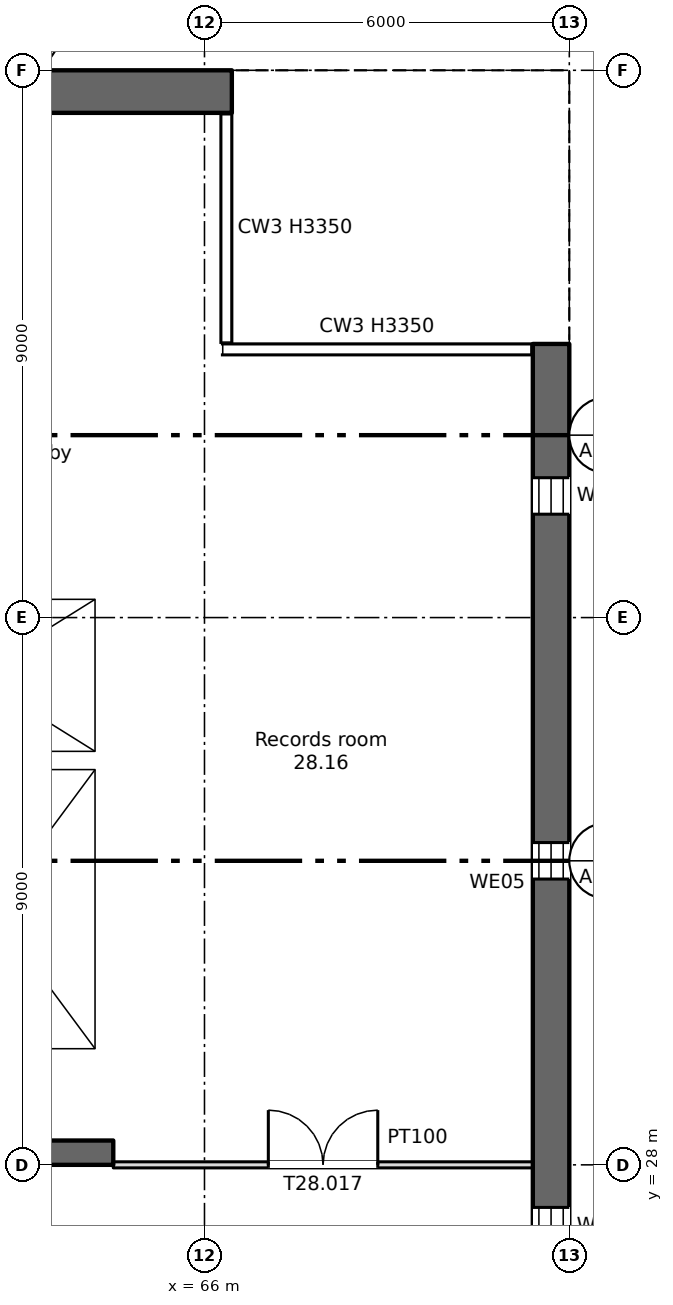
"""IFC4 building model, lengths in metres.
Left out: names, types, materials, properties, quantities, classifications, styles, units other than length and angle.
Written with IfcOpenShell. Run it as: python <this file> out.ifc"""

import sys

from ifc_helpers import new_model, si_unit, direction, frame, frame_2d, origin, place, context, subcontext, project, spatial, rectangle, extrude, element, fill, save


model = new_model("IFC4")
c1 = context("Model", 3, precision=1e-05, world=origin(), true_north=direction((0.0, 1.0)))
c2 = subcontext(c1, "Body", "Model", "MODEL_VIEW")
j1 = project(units=[si_unit("LENGTHUNIT", "METRE"), si_unit("PLANEANGLEUNIT", "RADIAN")], contexts=[c1])
p1 = place(None, origin())
s1 = spatial("IfcSite", under=j1, at=p1, CompositionType="ELEMENT")
p2 = place(p1, origin())
s2 = spatial("IfcBuilding", under=s1, at=p2, CompositionType="ELEMENT")
p3 = place(p2, frame((0.0, 0.0, 193.0)))
s3 = spatial("IfcBuildingStorey", under=s2, at=p3, CompositionType="ELEMENT", Elevation=193.0)
p4 = place(p3, frame((71.7, 7.5, 0.0), z_axis=(0.0, 0.0, 1.0), x_axis=(0.0, 1.0, 0.0)))
e1 = element("IfcWall", 1, at=p4, inside=s3, PredefinedType="SHEAR", context=c2, shape_type="SweptSolid", body=[
    extrude(rectangle(XDim=34.0, YDim=0.6, at=frame_2d((17.0, 0.0))), origin(), (0.0, 0.0, 1.0), 3.35),
])
p5 = place(p4, frame((1.2, 0.0, 0.6)))
e2 = element("IfcOpeningElement", 2, at=p5, cuts=e1, PredefinedType="OPENING", context=c2, shape_type="SweptSolid", body=[
    extrude(rectangle(XDim=0.6, YDim=2.4, at=frame_2d((0.3, 1.2))), frame((0.0, 0.31, 0.0), z_axis=(0.0, -1.0, 0.0), x_axis=(1.0, 0.0, 0.0)), (0.0, 0.0, 1.0), 0.62),
])
p6 = place(p4, frame((7.2, 0.0, 0.6)))
e3 = element("IfcOpeningElement", 3, at=p6, cuts=e1, PredefinedType="OPENING", context=c2, shape_type="SweptSolid", body=[
    extrude(rectangle(XDim=0.6, YDim=2.4, at=frame_2d((0.3, 1.2))), frame((0.0, 0.31, 0.0), z_axis=(0.0, -1.0, 0.0), x_axis=(1.0, 0.0, 0.0)), (0.0, 0.0, 1.0), 0.62),
])
p7 = place(p4, frame((13.2, 0.0, 0.6)))
e4 = element("IfcOpeningElement", 4, at=p7, cuts=e1, PredefinedType="OPENING", context=c2, shape_type="SweptSolid", body=[
    extrude(rectangle(XDim=0.6, YDim=2.4, at=frame_2d((0.3, 1.2))), frame((0.0, 0.31, 0.0), z_axis=(0.0, -1.0, 0.0), x_axis=(1.0, 0.0, 0.0)), (0.0, 0.0, 1.0), 0.62),
])
p8 = place(p4, frame((19.2, 0.0, 0.6)))
e5 = element("IfcOpeningElement", 5, at=p8, cuts=e1, PredefinedType="OPENING", context=c2, shape_type="SweptSolid", body=[
    extrude(rectangle(XDim=0.6, YDim=2.4, at=frame_2d((0.3, 1.2))), frame((0.0, 0.31, 0.0), z_axis=(0.0, -1.0, 0.0), x_axis=(1.0, 0.0, 0.0)), (0.0, 0.0, 1.0), 0.62),
])
p9 = place(p4, frame((25.2, 0.0, 0.6)))
e6 = element("IfcOpeningElement", 6, at=p9, cuts=e1, PredefinedType="OPENING", context=c2, shape_type="SweptSolid", body=[
    extrude(rectangle(XDim=0.6, YDim=2.4, at=frame_2d((0.3, 1.2))), frame((0.0, 0.31, 0.0), z_axis=(0.0, -1.0, 0.0), x_axis=(1.0, 0.0, 0.0)), (0.0, 0.0, 1.0), 0.62),
])
p10 = place(p4, frame((31.2, 0.0, 0.6)))
e7 = element("IfcOpeningElement", 7, at=p10, cuts=e1, PredefinedType="OPENING", context=c2, shape_type="SweptSolid", body=[
    extrude(rectangle(XDim=0.6, YDim=2.4, at=frame_2d((0.3, 1.2))), frame((0.0, 0.31, 0.0), z_axis=(0.0, -1.0, 0.0), x_axis=(1.0, 0.0, 0.0)), (0.0, 0.0, 1.0), 0.62),
])
p11 = place(p3, frame((11.55, 45.65, 0.0), z_axis=(0.0, 0.0, 1.0), x_axis=(1.0, 0.0, 0.0)))
e8 = element("IfcWall", 8, at=p11, inside=s3, PredefinedType="SHEAR", context=c2, shape_type="SweptSolid", body=[
    extrude(rectangle(XDim=54.9, YDim=0.7, at=frame_2d((27.45, 0.0))), origin(), (0.0, 0.0, 1.0), 3.35),
])
p12 = place(p11, frame((1.2, 0.0, 0.6)))
e9 = element("IfcOpeningElement", 9, at=p12, cuts=e8, PredefinedType="OPENING", context=c2, shape_type="SweptSolid", body=[
    extrude(rectangle(XDim=0.6, YDim=2.4, at=frame_2d((0.3, 1.2))), frame((0.0, 0.36, 0.0), z_axis=(0.0, -1.0, 0.0), x_axis=(1.0, 0.0, 0.0)), (0.0, 0.0, 1.0), 0.72),
])
p13 = place(p3, frame((6.6, 28.2, 0.0), z_axis=(0.0, 0.0, 1.0), x_axis=(1.0, 0.0, 0.0)))
e10 = element("IfcWall", 10, at=p13, inside=s3, PredefinedType="SHEAR", context=c2, shape_type="SweptSolid", body=[
    extrude(rectangle(XDim=57.9, YDim=0.4, at=frame_2d((28.95, 0.0))), origin(), (0.0, 0.0, 1.0), 3.35),
])
p14 = place(p13, frame((13.95, 0.0, 0.0)))
e11 = element("IfcOpeningElement", 11, at=p14, cuts=e10, PredefinedType="OPENING", context=c2, shape_type="SweptSolid", body=[
    extrude(rectangle(XDim=0.9, YDim=2.1, at=frame_2d((0.45, 1.05))), frame((0.0, 0.21, 0.0), z_axis=(0.0, -1.0, 0.0), x_axis=(1.0, 0.0, 0.0)), (0.0, 0.0, 1.0), 0.42),
])
p15 = place(p13, frame((48.663, 0.0, 0.0)))
e12 = element("IfcOpeningElement", 12, at=p15, cuts=e10, PredefinedType="OPENING", context=c2, shape_type="SweptSolid", body=[
    extrude(rectangle(XDim=0.9, YDim=2.1, at=frame_2d((0.45, 1.05))), frame((0.0, 0.21, 0.0), z_axis=(0.0, -1.0, 0.0), x_axis=(1.0, 0.0, 0.0)), (0.0, 0.0, 1.0), 0.42),
])
p16 = place(p13, frame((51.238, 0.0, 0.0)))
e13 = element("IfcOpeningElement", 13, at=p16, cuts=e10, PredefinedType="OPENING", context=c2, shape_type="SweptSolid", body=[
    extrude(rectangle(XDim=0.9, YDim=2.1, at=frame_2d((0.45, 1.05))), frame((0.0, 0.21, 0.0), z_axis=(0.0, -1.0, 0.0), x_axis=(1.0, 0.0, 0.0)), (0.0, 0.0, 1.0), 0.42),
])
p17 = place(p13, frame((1.45, 0.0, 0.0)))
e14 = element("IfcOpeningElement", 14, at=p17, cuts=e10, PredefinedType="OPENING", context=c2, shape_type="SweptSolid", body=[
    extrude(rectangle(XDim=0.9, YDim=2.1, at=frame_2d((0.45, 1.05))), frame((0.0, 0.21, 0.0), z_axis=(0.0, -1.0, 0.0), x_axis=(1.0, 0.0, 0.0)), (0.0, 0.0, 1.0), 0.42),
])
p18 = place(p13, frame((4.8, 0.0, 0.0)))
e15 = element("IfcOpeningElement", 15, at=p18, cuts=e10, PredefinedType="OPENING", context=c2, shape_type="SweptSolid", body=[
    extrude(rectangle(XDim=1.2, YDim=2.1, at=frame_2d((0.6, 1.05))), frame((0.0, 0.21, 0.0), z_axis=(0.0, -1.0, 0.0), x_axis=(1.0, 0.0, 0.0)), (0.0, 0.0, 1.0), 0.42),
])
p19 = place(p13, frame((31.8, 0.0, 0.0)))
e16 = element("IfcOpeningElement", 16, at=p19, cuts=e10, PredefinedType="OPENING", context=c2, shape_type="SweptSolid", body=[
    extrude(rectangle(XDim=1.2, YDim=2.1, at=frame_2d((0.6, 1.05))), frame((0.0, 0.21, 0.0), z_axis=(0.0, -1.0, 0.0), x_axis=(1.0, 0.0, 0.0)), (0.0, 0.0, 1.0), 0.42),
])
p20 = place(p13, frame((55.3, 0.0, 0.0)))
e17 = element("IfcOpeningElement", 17, at=p20, cuts=e10, PredefinedType="OPENING", context=c2, shape_type="SweptSolid", body=[
    extrude(rectangle(XDim=1.2, YDim=2.1, at=frame_2d((0.6, 1.05))), frame((0.0, 0.21, 0.0), z_axis=(0.0, -1.0, 0.0), x_axis=(1.0, 0.0, 0.0)), (0.0, 0.0, 1.0), 0.42),
])
p21 = place(p13, frame((21.8, 0.0, 0.0)))
e18 = element("IfcOpeningElement", 18, at=p21, cuts=e10, PredefinedType="OPENING", context=c2, shape_type="SweptSolid", body=[
    extrude(rectangle(XDim=1.2, YDim=2.1, at=frame_2d((0.6, 1.05))), frame((0.0, 0.21, 0.0), z_axis=(0.0, -1.0, 0.0), x_axis=(1.0, 0.0, 0.0)), (0.0, 0.0, 1.0), 0.42),
])
p22 = place(p13, frame((41.8, 0.0, 0.0)))
e19 = element("IfcOpeningElement", 19, at=p22, cuts=e10, PredefinedType="OPENING", context=c2, shape_type="SweptSolid", body=[
    extrude(rectangle(XDim=1.2, YDim=2.1, at=frame_2d((0.6, 1.05))), frame((0.0, 0.21, 0.0), z_axis=(0.0, -1.0, 0.0), x_axis=(1.0, 0.0, 0.0)), (0.0, 0.0, 1.0), 0.42),
])
p23 = place(p13, frame((24.95, 0.0, 0.0)))
e20 = element("IfcOpeningElement", 20, at=p23, cuts=e10, PredefinedType="OPENING", context=c2, shape_type="SweptSolid", body=[
    extrude(rectangle(XDim=2.4, YDim=2.1, at=frame_2d((1.2, 1.05))), frame((0.0, 0.21, 0.0), z_axis=(0.0, -1.0, 0.0), x_axis=(1.0, 0.0, 0.0)), (0.0, 0.0, 1.0), 0.42),
])
p24 = place(p13, frame((37.45, 0.0, 0.0)))
e21 = element("IfcOpeningElement", 21, at=p24, cuts=e10, PredefinedType="OPENING", context=c2, shape_type="SweptSolid", body=[
    extrude(rectangle(XDim=2.4, YDim=2.1, at=frame_2d((1.2, 1.05))), frame((0.0, 0.21, 0.0), z_axis=(0.0, -1.0, 0.0), x_axis=(1.0, 0.0, 0.0)), (0.0, 0.0, 1.0), 0.42),
])
p25 = place(p13, frame((8.1, 0.0, 0.0)))
e22 = element("IfcOpeningElement", 22, at=p25, cuts=e10, PredefinedType="OPENING", context=c2, shape_type="SweptSolid", body=[
    extrude(rectangle(XDim=2.4, YDim=2.1, at=frame_2d((1.2, 1.05))), frame((0.0, 0.21, 0.0), z_axis=(0.0, -1.0, 0.0), x_axis=(1.0, 0.0, 0.0)), (0.0, 0.0, 1.0), 0.42),
])
p26 = place(p13, frame((28.95, 0.0, 0.0)))
e23 = element("IfcOpeningElement", 23, at=p26, cuts=e10, PredefinedType="OPENING", context=c2, shape_type="SweptSolid", body=[
    extrude(rectangle(XDim=0.9, YDim=2.1, at=frame_2d((0.45, 1.05))), frame((0.0, 0.21, 0.0), z_axis=(0.0, -1.0, 0.0), x_axis=(1.0, 0.0, 0.0)), (0.0, 0.0, 1.0), 0.42),
])
p27 = place(p13, frame((34.95, 0.0, 0.0)))
e24 = element("IfcOpeningElement", 24, at=p27, cuts=e10, PredefinedType="OPENING", context=c2, shape_type="SweptSolid", body=[
    extrude(rectangle(XDim=0.9, YDim=2.1, at=frame_2d((0.45, 1.05))), frame((0.0, 0.21, 0.0), z_axis=(0.0, -1.0, 0.0), x_axis=(1.0, 0.0, 0.0)), (0.0, 0.0, 1.0), 0.42),
])
p28 = place(p3, frame((64.35, 34.8, 0.0), z_axis=(0.0, 0.0, 1.0), x_axis=(0.0, 1.0, 0.0)))
e25 = element("IfcWall", 25, at=p28, inside=s3, PredefinedType="SHEAR", context=c2, shape_type="SweptSolid", body=[
    extrude(rectangle(XDim=10.5, YDim=0.3, at=frame_2d((5.25, 0.0))), origin(), (0.0, 0.0, 1.0), 3.35),
])
p29 = place(p3, frame((64.35, 28.4, 0.0), z_axis=(0.0, 0.0, 1.0), x_axis=(0.0, 1.0, 0.0)))
e26 = element("IfcWall", 26, at=p29, inside=s3, PredefinedType="SHEAR", context=c2, shape_type="SweptSolid", body=[
    extrude(rectangle(XDim=6.1, YDim=0.3, at=frame_2d((3.05, 0.0))), origin(), (0.0, 0.0, 1.0), 3.35),
])
p30 = place(p3, frame((60.2, 34.65, 0.0), z_axis=(0.0, 0.0, 1.0), x_axis=(1.0, 0.0, 0.0)))
e27 = element("IfcWall", 27, at=p30, inside=s3, PredefinedType="SHEAR", context=c2, shape_type="SweptSolid", body=[
    extrude(rectangle(XDim=4.3, YDim=0.3, at=frame_2d((2.15, 0.0))), origin(), (0.0, 0.0, 1.0), 3.35),
])
p31 = place(p3, frame((60.2, 37.45, 0.0), z_axis=(0.0, 0.0, 1.0), x_axis=(1.0, 0.0, 0.0)))
e28 = element("IfcWall", 28, at=p31, inside=s3, PredefinedType="SHEAR", context=c2, shape_type="SweptSolid", body=[
    extrude(rectangle(XDim=4.0, YDim=0.3, at=frame_2d((2.0, 0.0))), origin(), (0.0, 0.0, 1.0), 3.35),
])
p32 = place(p31, frame((1.45, 0.0, 0.0)))
e29 = element("IfcOpeningElement", 29, at=p32, cuts=e28, PredefinedType="OPENING", context=c2, shape_type="SweptSolid", body=[
    extrude(rectangle(XDim=1.1, YDim=2.1, at=frame_2d((0.55, 1.05))), frame((0.0, 0.16, 0.0), z_axis=(0.0, -1.0, 0.0), x_axis=(1.0, 0.0, 0.0)), (0.0, 0.0, 1.0), 0.32),
])
p33 = place(p3, frame((64.5, 28.0, 0.0), z_axis=(0.0, 0.0, 1.0), x_axis=(1.0, 0.0, 0.0)))
e30 = element("IfcWall", 30, at=p33, inside=s3, PredefinedType="PARTITIONING", context=c2, shape_type="SweptSolid", body=[
    extrude(rectangle(XDim=6.9, YDim=0.1, at=frame_2d((3.45, 0.0))), origin(), (0.0, 0.0, 1.0), 3.35),
])
p34 = place(p33, frame((2.55, 0.0, 0.0)))
e31 = element("IfcOpeningElement", 31, at=p34, cuts=e30, PredefinedType="OPENING", context=c2, shape_type="SweptSolid", body=[
    extrude(rectangle(XDim=1.8, YDim=2.1, at=frame_2d((0.9, 1.05))), frame((0.0, 0.06, 0.0), z_axis=(0.0, -1.0, 0.0), x_axis=(1.0, 0.0, 0.0)), (0.0, 0.0, 1.0), 0.12),
])
p35 = place(p8, origin())
e32 = element("IfcWindow", 32, at=p35, inside=s3, PartitioningType="SINGLE_PANEL", PredefinedType="WINDOW", context=c2, shape_type="SweptSolid", body=[
    extrude(rectangle(XDim=0.6, YDim=2.4, at=frame_2d((0.3, 1.2))), frame((0.0, 0.03, 0.0), z_axis=(0.0, -1.0, 0.0), x_axis=(1.0, 0.0, 0.0)), (0.0, 0.0, 1.0), 0.06),
])
fill(e5, e32)
p36 = place(p9, origin())
e33 = element("IfcWindow", 33, at=p36, inside=s3, PartitioningType="SINGLE_PANEL", PredefinedType="WINDOW", context=c2, shape_type="SweptSolid", body=[
    extrude(rectangle(XDim=0.6, YDim=2.4, at=frame_2d((0.3, 1.2))), frame((0.0, 0.03, 0.0), z_axis=(0.0, -1.0, 0.0), x_axis=(1.0, 0.0, 0.0)), (0.0, 0.0, 1.0), 0.06),
])
fill(e6, e33)
p37 = place(p10, origin())
e34 = element("IfcWindow", 34, at=p37, inside=s3, PartitioningType="SINGLE_PANEL", PredefinedType="WINDOW", context=c2, shape_type="SweptSolid", body=[
    extrude(rectangle(XDim=0.6, YDim=2.4, at=frame_2d((0.3, 1.2))), frame((0.0, 0.03, 0.0), z_axis=(0.0, -1.0, 0.0), x_axis=(1.0, 0.0, 0.0)), (0.0, 0.0, 1.0), 0.06),
])
fill(e7, e34)
p38 = place(p34, origin())
e35 = element("IfcDoor", 35, at=p38, inside=s3, OperationType="DOUBLE_DOOR_SINGLE_SWING", PredefinedType="DOOR", context=c2, shape_type="SweptSolid", body=[
    extrude(rectangle(XDim=1.8, YDim=2.1, at=frame_2d((0.9, 1.05))), frame((0.0, 0.025, 0.0), z_axis=(0.0, -1.0, 0.0), x_axis=(1.0, 0.0, 0.0)), (0.0, 0.0, 1.0), 0.05),
])
fill(e31, e35)
save(model, sys.argv[1])
